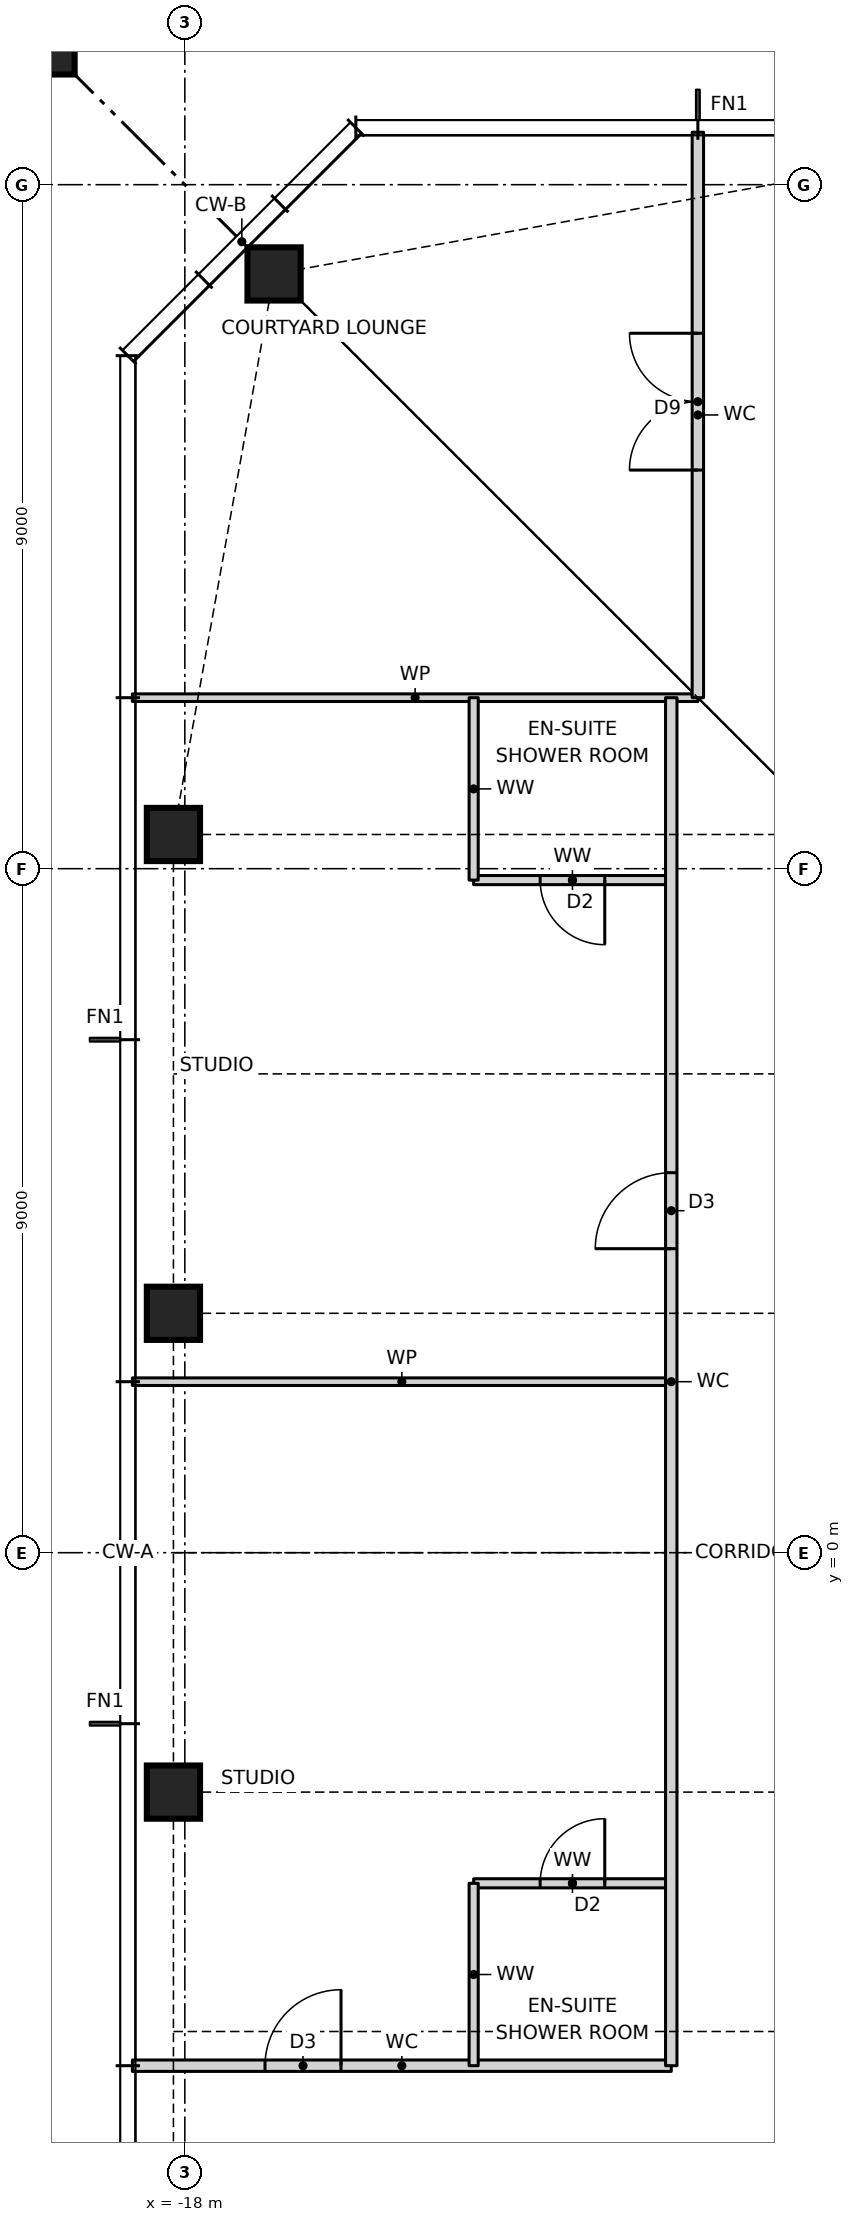
"""IFC4 building model, lengths in metres.
Left out: names, types, materials, properties, quantities, classifications, styles, units other than length and angle.
Written with IfcOpenShell. Run it as: python <this file> out.ifc"""

import sys

from ifc_helpers import new_model, si_unit, direction, frame, frame_2d, origin, origin_2d, place, context, subcontext, project, spatial, rectangle, hollow_rectangle, i_section, extrude, element, fill, save


model = new_model("IFC4")
c1 = context("Model", 3, precision=1e-05, world=origin(), true_north=direction((0.0, 1.0)))
c2 = subcontext(c1, "Body", "Model", "MODEL_VIEW")
j1 = project(units=[si_unit("LENGTHUNIT", "METRE"), si_unit("PLANEANGLEUNIT", "RADIAN")], contexts=[c1])
p1 = place(None, origin())
s1 = spatial("IfcSite", under=j1, at=p1, CompositionType="ELEMENT")
p2 = place(p1, origin())
s2 = spatial("IfcBuilding", under=s1, at=p2, CompositionType="ELEMENT")
p3 = place(p2, frame((0.0, 0.0, 198.5)))
s3 = spatial("IfcBuildingStorey", under=s2, at=p3, CompositionType="ELEMENT", Elevation=198.5)
for number, where, z_axis, x_axis in (
    (1, (-16.826, 16.826, 0.0), (0.0, 0.0, 1.0), (1.0, 0.0, 0.0)),
    (2, (-18.15, 9.45, 0.0), (0.0, 0.0, 1.0), (1.0, 0.0, 0.0)),
    (3, (-18.15, 3.15, 0.0), (0.0, 0.0, 1.0), (1.0, 0.0, 0.0)),
    (4, (-18.15, -3.15, 0.0), (0.0, 0.0, 1.0), (1.0, 0.0, 0.0)),
):
    element("IfcColumn", number, at=place(p3, frame(where, z_axis=z_axis, x_axis=x_axis)), inside=s3, PredefinedType="COLUMN", context=c2, shape_type="SweptSolid", body=[
        extrude(hollow_rectangle(XDim=0.7, YDim=0.7, WallThickness=0.06, at=origin_2d()), origin(), (0.0, 0.0, 1.0), 3.5),
    ])
p4 = place(p3, frame((-21.65, 21.65, 0.0), z_axis=(0.0, 0.0, 1.0), x_axis=(1.0, 0.0, 0.0)))
e5 = element("IfcColumn", 5, at=p4, inside=s3, PredefinedType="COLUMN", context=c2, shape_type="SweptSolid", body=[
    extrude(rectangle(XDim=4.4, YDim=4.4, at=origin_2d()), origin(), (0.0, 0.0, 1.0), 3.5),
    extrude(i_section(OverallWidth=0.478, OverallDepth=0.599, WebThickness=0.1, FlangeThickness=0.14, at=origin_2d()), origin(), (0.0, 0.0, 1.0), 3.5),
])
p5 = place(p3, frame((-18.69, -6.75, 0.0), z_axis=(0.0, 0.0, 1.0), x_axis=(1.0, 0.0, 0.0)))
e6 = element("IfcWall", 6, at=p5, inside=s3, PredefinedType="PARTITIONING", context=c2, shape_type="SweptSolid", body=[
    extrude(rectangle(XDim=7.09, YDim=0.15, at=frame_2d((3.545, 0.0))), origin(), (0.0, 0.0, 1.0), 3.27),
])
p6 = place(p5, frame((1.745, 0.0, 0.0)))
e7 = element("IfcOpeningElement", 7, at=p6, cuts=e6, PredefinedType="OPENING", context=c2, shape_type="SweptSolid", body=[
    extrude(rectangle(XDim=1.0, YDim=2.1, at=frame_2d((0.5, 1.05))), frame((0.0, 0.085, 0.0), z_axis=(0.0, -1.0, 0.0), x_axis=(1.0, 0.0, 0.0)), (0.0, 0.0, 1.0), 0.17),
])
p7 = place(p3, frame((-14.2, -4.35, 0.0), z_axis=(0.0, 0.0, 1.0), x_axis=(1.0, 0.0, 0.0)))
e8 = element("IfcWall", 8, at=p7, inside=s3, PredefinedType="PARTITIONING", context=c2, shape_type="SweptSolid", body=[
    extrude(rectangle(XDim=2.6, YDim=0.12, at=frame_2d((1.3, 0.0))), origin(), (0.0, 0.0, 1.0), 3.27),
])
p8 = place(p7, frame((0.875, 0.0, 0.0)))
e9 = element("IfcOpeningElement", 9, at=p8, cuts=e8, PredefinedType="OPENING", context=c2, shape_type="SweptSolid", body=[
    extrude(rectangle(XDim=0.85, YDim=2.1, at=frame_2d((0.425, 1.05))), frame((0.0, 0.07, 0.0), z_axis=(0.0, -1.0, 0.0), x_axis=(1.0, 0.0, 0.0)), (0.0, 0.0, 1.0), 0.14),
])
p9 = place(p3, frame((-18.69, 2.25, 0.0), z_axis=(0.0, 0.0, 1.0), x_axis=(1.0, 0.0, 0.0)))
e10 = element("IfcWall", 10, at=p9, inside=s3, PredefinedType="PARTITIONING", context=c2, shape_type="SweptSolid", body=[
    extrude(rectangle(XDim=7.09, YDim=0.1, at=frame_2d((3.545, 0.0))), origin(), (0.0, 0.0, 1.0), 3.27),
])
p10 = place(p3, frame((-14.2, 8.85, 0.0), z_axis=(0.0, 0.0, 1.0), x_axis=(1.0, 0.0, 0.0)))
e11 = element("IfcWall", 11, at=p10, inside=s3, PredefinedType="PARTITIONING", context=c2, shape_type="SweptSolid", body=[
    extrude(rectangle(XDim=2.6, YDim=0.12, at=frame_2d((1.3, 0.0))), origin(), (0.0, 0.0, 1.0), 3.27),
])
p11 = place(p10, frame((0.875, 0.0, 0.0)))
e12 = element("IfcOpeningElement", 12, at=p11, cuts=e11, PredefinedType="OPENING", context=c2, shape_type="SweptSolid", body=[
    extrude(rectangle(XDim=0.85, YDim=2.1, at=frame_2d((0.425, 1.05))), frame((0.0, 0.07, 0.0), z_axis=(0.0, -1.0, 0.0), x_axis=(1.0, 0.0, 0.0)), (0.0, 0.0, 1.0), 0.14),
])
p12 = place(p3, frame((-18.69, 11.25, 0.0), z_axis=(0.0, 0.0, 1.0), x_axis=(1.0, 0.0, 0.0)))
e13 = element("IfcWall", 13, at=p12, inside=s3, PredefinedType="PARTITIONING", context=c2, shape_type="SweptSolid", body=[
    extrude(rectangle(XDim=7.44, YDim=0.1, at=frame_2d((3.72, 0.0))), origin(), (0.0, 0.0, 1.0), 3.27),
])
p13 = place(p3, frame((-11.25, 11.25, 0.0), z_axis=(0.0, 0.0, 1.0), x_axis=(0.0, 1.0, 0.0)))
e14 = element("IfcWall", 14, at=p13, inside=s3, PredefinedType="PARTITIONING", context=c2, shape_type="SweptSolid", body=[
    extrude(rectangle(XDim=7.44, YDim=0.15, at=frame_2d((3.72, 0.0))), origin(), (0.0, 0.0, 1.0), 3.27),
])
p14 = place(p13, frame((2.995, 0.0, 0.0)))
e15 = element("IfcOpeningElement", 15, at=p14, cuts=e14, PredefinedType="OPENING", context=c2, shape_type="SweptSolid", body=[
    extrude(rectangle(XDim=1.8, YDim=2.1, at=frame_2d((0.9, 1.05))), frame((0.0, 0.085, 0.0), z_axis=(0.0, -1.0, 0.0), x_axis=(1.0, 0.0, 0.0)), (0.0, 0.0, 1.0), 0.17),
])
p15 = place(p3, frame((-11.6, -6.75, 0.0), z_axis=(0.0, 0.0, 1.0), x_axis=(0.0, 1.0, 0.0)))
e16 = element("IfcWall", 16, at=p15, inside=s3, PredefinedType="PARTITIONING", context=c2, shape_type="SweptSolid", body=[
    extrude(rectangle(XDim=18.0, YDim=0.15, at=frame_2d((9.0, 0.0))), origin(), (0.0, 0.0, 1.0), 3.27),
])
p16 = place(p15, frame((10.75, 0.0, 0.0)))
e17 = element("IfcOpeningElement", 17, at=p16, cuts=e16, PredefinedType="OPENING", context=c2, shape_type="SweptSolid", body=[
    extrude(rectangle(XDim=1.0, YDim=2.1, at=frame_2d((0.5, 1.05))), frame((0.0, 0.085, 0.0), z_axis=(0.0, -1.0, 0.0), x_axis=(1.0, 0.0, 0.0)), (0.0, 0.0, 1.0), 0.17),
])
for number, where, z_axis, x_axis in (
    (18, (-14.2, -6.75, 0.0), (0.0, 0.0, 1.0), (0.0, 1.0, 0.0)),
    (19, (-14.2, 8.85, 0.0), (0.0, 0.0, 1.0), (0.0, 1.0, 0.0)),
):
    element("IfcWall", number, at=place(p3, frame(where, z_axis=z_axis, x_axis=x_axis)), inside=s3, PredefinedType="PARTITIONING", context=c2, shape_type="SweptSolid", body=[
        extrude(rectangle(XDim=2.4, YDim=0.12, at=frame_2d((1.2, 0.0))), origin(), (0.0, 0.0, 1.0), 3.27),
    ])
p17 = place(p16, origin())
e20 = element("IfcDoor", 20, at=p17, inside=s3, OperationType="SINGLE_SWING_LEFT", PredefinedType="DOOR", context=c2, shape_type="SweptSolid", body=[
    extrude(rectangle(XDim=1.0, YDim=2.1, at=frame_2d((0.5, 1.05))), frame((0.0, 0.025, 0.0), z_axis=(0.0, -1.0, 0.0), x_axis=(1.0, 0.0, 0.0)), (0.0, 0.0, 1.0), 0.05),
])
fill(e17, e20)
p18 = place(p11, frame((0.85, 0.0, 0.0), z_axis=(0.0, 0.0, 1.0), x_axis=(-1.0, 0.0, 0.0)))
e21 = element("IfcDoor", 21, at=p18, inside=s3, OperationType="SINGLE_SWING_LEFT", PredefinedType="DOOR", context=c2, shape_type="SweptSolid", body=[
    extrude(rectangle(XDim=0.85, YDim=2.1, at=frame_2d((0.425, 1.05))), frame((0.0, 0.025, 0.0), z_axis=(0.0, -1.0, 0.0), x_axis=(1.0, 0.0, 0.0)), (0.0, 0.0, 1.0), 0.05),
])
fill(e12, e21)
p19 = place(p6, origin())
e22 = element("IfcDoor", 22, at=p19, inside=s3, OperationType="SINGLE_SWING_RIGHT", PredefinedType="DOOR", context=c2, shape_type="SweptSolid", body=[
    extrude(rectangle(XDim=1.0, YDim=2.1, at=frame_2d((0.5, 1.05))), frame((0.0, 0.025, 0.0), z_axis=(0.0, -1.0, 0.0), x_axis=(1.0, 0.0, 0.0)), (0.0, 0.0, 1.0), 0.05),
])
fill(e7, e22)
p20 = place(p8, origin())
e23 = element("IfcDoor", 23, at=p20, inside=s3, OperationType="SINGLE_SWING_RIGHT", PredefinedType="DOOR", context=c2, shape_type="SweptSolid", body=[
    extrude(rectangle(XDim=0.85, YDim=2.1, at=frame_2d((0.425, 1.05))), frame((0.0, 0.025, 0.0), z_axis=(0.0, -1.0, 0.0), x_axis=(1.0, 0.0, 0.0)), (0.0, 0.0, 1.0), 0.05),
])
fill(e9, e23)
p21 = place(p14, origin())
e24 = element("IfcDoor", 24, at=p21, inside=s3, OperationType="DOUBLE_DOOR_SINGLE_SWING", PredefinedType="DOOR", context=c2, shape_type="SweptSolid", body=[
    extrude(rectangle(XDim=1.8, YDim=2.1, at=frame_2d((0.9, 1.05))), frame((0.0, 0.025, 0.0), z_axis=(0.0, -1.0, 0.0), x_axis=(1.0, 0.0, 0.0)), (0.0, 0.0, 1.0), 0.05),
])
fill(e15, e24)
save(model, sys.argv[1])
